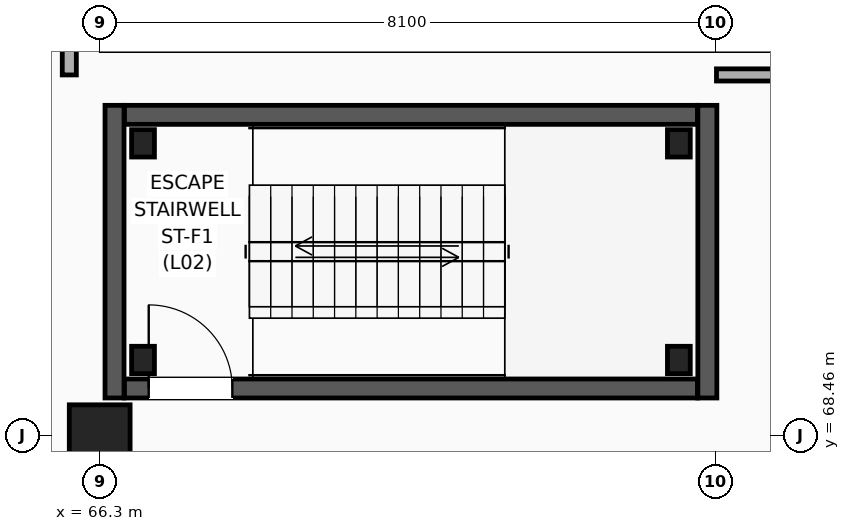
"""IFC4 building model, lengths in metres.
Left out: names, types, materials, properties, quantities, classifications, styles, units other than length and angle.
Written with IfcOpenShell. Run it as: python <this file> out.ifc"""

import sys

from ifc_helpers import new_model, si_unit, direction, frame, frame_2d, origin, origin_2d, place, context, subcontext, project, spatial, rectangle, i_section, extrude, element, fill, save


model = new_model("IFC4")
c1 = context("Model", 3, precision=1e-05, world=origin(), true_north=direction((0.0, 1.0)))
c2 = subcontext(c1, "Body", "Model", "MODEL_VIEW")
j1 = project(units=[si_unit("LENGTHUNIT", "METRE"), si_unit("PLANEANGLEUNIT", "RADIAN")], contexts=[c1])
p1 = place(None, origin())
s1 = spatial("IfcSite", under=j1, at=p1, CompositionType="ELEMENT")
p2 = place(p1, origin())
s2 = spatial("IfcBuilding", under=s1, at=p2, CompositionType="ELEMENT")
p3 = place(p2, frame((0.0, 0.0, 10.2)))
s3 = spatial("IfcBuildingStorey", under=s2, at=p3, CompositionType="ELEMENT", Elevation=10.2)
for number, where, z_axis, x_axis in (
    (1, (66.87, 69.45, 0.0), (0.0, 0.0, 1.0), (1.0, 0.0, 0.0)),
    (2, (66.87, 72.3, 0.0), (0.0, 0.0, 1.0), (1.0, 0.0, 0.0)),
    (3, (73.92, 69.45, 0.0), (0.0, 0.0, 1.0), (1.0, 0.0, 0.0)),
    (4, (73.92, 72.3, 0.0), (0.0, 0.0, 1.0), (1.0, 0.0, 0.0)),
):
    element("IfcColumn", number, at=place(p3, frame(where, z_axis=z_axis, x_axis=x_axis)), inside=s3, PredefinedType="COLUMN", context=c2, shape_type="SweptSolid", body=[
        extrude(i_section(OverallWidth=0.3, OverallDepth=0.36, WebThickness=0.012, FlangeThickness=0.022, FilletRadius=0.027, at=origin_2d()), origin(), (0.0, 0.0, 1.0), 4.5),
    ])
p4 = place(p3, frame((66.3, 68.46, 0.0), z_axis=(0.0, 0.0, 1.0), x_axis=(1.0, 0.0, 0.0)))
e5 = element("IfcColumn", 5, at=p4, inside=s3, PredefinedType="COLUMN", context=c2, shape_type="SweptSolid", body=[
    extrude(rectangle(XDim=0.8, YDim=0.8, at=origin_2d()), origin(), (0.0, 0.0, 1.0), 4.5),
])
p5 = place(p3, frame((66.625, 69.075, 0.0), z_axis=(0.0, 0.0, 1.0), x_axis=(1.0, 0.0, 0.0)))
e6 = element("IfcWall", 6, at=p5, inside=s3, PredefinedType="SHEAR", context=c2, shape_type="SweptSolid", body=[
    extrude(rectangle(XDim=7.54, YDim=0.25, at=frame_2d((3.77, 0.0))), origin(), (0.0, 0.0, 1.0), 4.225),
])
p6 = place(p5, frame((0.32, 0.0, 0.0)))
e7 = element("IfcOpeningElement", 7, at=p6, cuts=e6, PredefinedType="OPENING", context=c2, shape_type="SweptSolid", body=[
    extrude(rectangle(XDim=1.1, YDim=2.2, at=frame_2d((0.55, 1.1))), frame((0.0, 0.135, 0.0), z_axis=(0.0, -1.0, 0.0), x_axis=(1.0, 0.0, 0.0)), (0.0, 0.0, 1.0), 0.27),
])
p7 = place(p3, frame((66.625, 72.675, 0.0), z_axis=(0.0, 0.0, 1.0), x_axis=(1.0, 0.0, 0.0)))
e8 = element("IfcWall", 8, at=p7, inside=s3, PredefinedType="SHEAR", context=c2, shape_type="SweptSolid", body=[
    extrude(rectangle(XDim=7.54, YDim=0.25, at=frame_2d((3.77, 0.0))), origin(), (0.0, 0.0, 1.0), 4.225),
])
for number, where, z_axis, x_axis in (
    (9, (66.495, 68.95, 0.0), (0.0, 0.0, 1.0), (0.0, 1.0, 0.0)),
    (10, (74.295, 68.95, 0.0), (0.0, 0.0, 1.0), (0.0, 1.0, 0.0)),
):
    element("IfcWall", number, at=place(p3, frame(where, z_axis=z_axis, x_axis=x_axis)), inside=s3, PredefinedType="SHEAR", context=c2, shape_type="SweptSolid", body=[
        extrude(rectangle(XDim=3.85, YDim=0.25, at=frame_2d((1.925, 0.0))), origin(), (0.0, 0.0, 1.0), 4.225),
    ])
p8 = place(p3, frame((65.9, 73.2, 0.0), z_axis=(0.0, 0.0, 1.0), x_axis=(0.0, 1.0, 0.0)))
e11 = element("IfcWall", 11, at=p8, inside=s3, PredefinedType="PARTITIONING", context=c2, shape_type="SweptSolid", body=[
    extrude(rectangle(XDim=2.295, YDim=0.185, at=frame_2d((1.147, 0.0))), origin(), (0.0, 0.0, 1.0), 4.205),
])
p9 = place(p8, frame((0.32, 0.0, 0.0)))
e12 = element("IfcOpeningElement", 12, at=p9, cuts=e11, PredefinedType="OPENING", context=c2, shape_type="SweptSolid", body=[
    extrude(rectangle(XDim=1.05, YDim=2.25, at=frame_2d((0.525, 1.125))), frame((0.0, 0.103, 0.0), z_axis=(0.0, -1.0, 0.0), x_axis=(1.0, 0.0, 0.0)), (0.0, 0.0, 1.0), 0.205),
])
p10 = place(p3, frame((74.415, 73.2, 0.0), z_axis=(0.0, 0.0, 1.0), x_axis=(1.0, 0.0, 0.0)))
e13 = element("IfcWall", 13, at=p10, inside=s3, PredefinedType="PARTITIONING", context=c2, shape_type="SweptSolid", body=[
    extrude(rectangle(XDim=11.785, YDim=0.16, at=frame_2d((5.893, 0.0))), origin(), (0.0, 0.0, 1.0), 3.897),
])
p11 = place(p6, origin())
e14 = element("IfcDoor", 14, at=p11, inside=s3, OperationType="SINGLE_SWING_LEFT", PredefinedType="DOOR", context=c2, shape_type="SweptSolid", body=[
    extrude(rectangle(XDim=1.1, YDim=2.2, at=frame_2d((0.55, 1.1))), frame((0.0, 0.025, 0.0), z_axis=(0.0, -1.0, 0.0), x_axis=(1.0, 0.0, 0.0)), (0.0, 0.0, 1.0), 0.05),
])
fill(e7, e14)
save(model, sys.argv[1])
